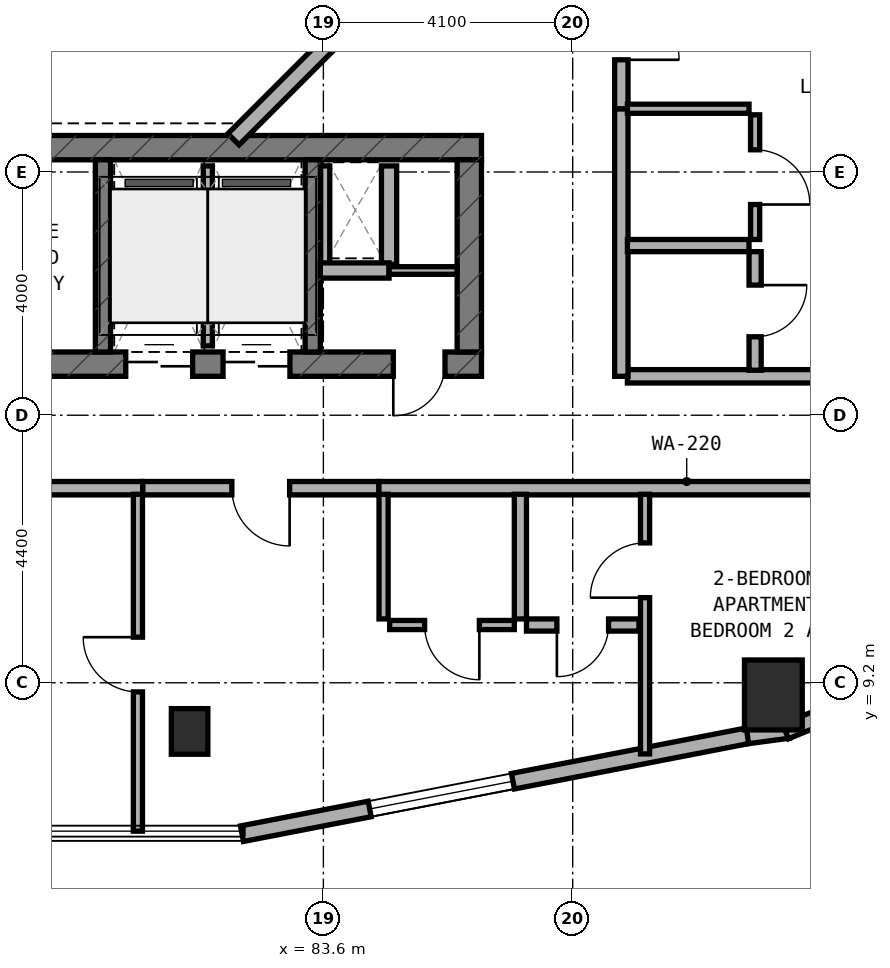
"""IFC4 building model, lengths in metres.
Left out: names, types, materials, properties, quantities, classifications, styles, units other than length and angle.
Written with IfcOpenShell. Run it as: python <this file> out.ifc"""

import sys

from ifc_helpers import new_model, si_unit, direction, frame, frame_2d, origin, origin_2d, place, context, subcontext, project, spatial, rectangle, extrude, element, fill, save


model = new_model("IFC4")
c1 = context("Model", 3, precision=1e-05, world=origin(), true_north=direction((0.0, 1.0)))
c2 = subcontext(c1, "Body", "Model", "MODEL_VIEW")
j1 = project(units=[si_unit("LENGTHUNIT", "METRE"), si_unit("PLANEANGLEUNIT", "RADIAN")], contexts=[c1])
p1 = place(None, origin())
s1 = spatial("IfcSite", under=j1, at=p1, CompositionType="ELEMENT")
p2 = place(p1, origin())
s2 = spatial("IfcBuilding", under=s1, at=p2, CompositionType="ELEMENT")
p3 = place(p2, frame((0.0, 0.0, 98.5)))
s3 = spatial("IfcBuildingStorey", under=s2, at=p3, CompositionType="ELEMENT", Elevation=98.5)
p4 = place(p3, frame((68.0, 14.44, 0.0), z_axis=(0.0, 0.0, 1.0), x_axis=(1.0, 0.0, 0.0)))
e1 = element("IfcWall", 1, at=p4, inside=s3, PredefinedType="SHEAR", context=c2, shape_type="SweptSolid", body=[
    extrude(rectangle(XDim=18.2, YDim=0.4, at=frame_2d((9.1, 0.0))), origin(), (0.0, 0.0, 1.0), 3.5),
])
p5 = place(p4, frame((9.15, 0.0, 0.0)))
e2 = element("IfcOpeningElement", 2, at=p5, cuts=e1, PredefinedType="OPENING", context=c2, shape_type="SweptSolid", body=[
    extrude(rectangle(XDim=1.2, YDim=2.15, at=frame_2d((0.6, 1.075))), frame((0.0, 0.21, 0.0), z_axis=(0.0, -1.0, 0.0), x_axis=(1.0, 0.0, 0.0)), (0.0, 0.0, 1.0), 0.42),
])
p6 = place(p4, frame((16.75, 0.0, 0.0)))
e3 = element("IfcOpeningElement", 3, at=p6, cuts=e1, PredefinedType="OPENING", context=c2, shape_type="SweptSolid", body=[
    extrude(rectangle(XDim=0.85, YDim=2.1, at=frame_2d((0.425, 1.05))), frame((0.0, 0.21, 0.0), z_axis=(0.0, -1.0, 0.0), x_axis=(1.0, 0.0, 0.0)), (0.0, 0.0, 1.0), 0.42),
])
p7 = place(p4, frame((12.35, 0.0, 0.0)))
e4 = element("IfcOpeningElement", 4, at=p7, cuts=e1, PredefinedType="OPENING", context=c2, shape_type="SweptSolid", body=[
    extrude(rectangle(XDim=1.1, YDim=2.15, at=frame_2d((0.55, 1.075))), frame((0.0, 0.21, 0.0), z_axis=(0.0, -1.0, 0.0), x_axis=(1.0, 0.0, 0.0)), (0.0, 0.0, 1.0), 0.42),
])
p8 = place(p4, frame((13.95, 0.0, 0.0)))
e5 = element("IfcOpeningElement", 5, at=p8, cuts=e1, PredefinedType="OPENING", context=c2, shape_type="SweptSolid", body=[
    extrude(rectangle(XDim=1.1, YDim=2.15, at=frame_2d((0.55, 1.075))), frame((0.0, 0.21, 0.0), z_axis=(0.0, -1.0, 0.0), x_axis=(1.0, 0.0, 0.0)), (0.0, 0.0, 1.0), 0.42),
])
p9 = place(p3, frame((68.0, 18.0, 0.0), z_axis=(0.0, 0.0, 1.0), x_axis=(1.0, 0.0, 0.0)))
e6 = element("IfcWall", 6, at=p9, inside=s3, PredefinedType="SHEAR", context=c2, shape_type="SweptSolid", body=[
    extrude(rectangle(XDim=18.2, YDim=0.4, at=frame_2d((9.1, 0.0))), origin(), (0.0, 0.0, 1.0), 3.5),
])
p10 = place(p3, frame((86.0, 14.64, 0.0), z_axis=(0.0, 0.0, 1.0), x_axis=(0.0, 1.0, 0.0)))
e7 = element("IfcWall", 7, at=p10, inside=s3, PredefinedType="SHEAR", context=c2, shape_type="SweptSolid", body=[
    extrude(rectangle(XDim=3.16, YDim=0.4, at=frame_2d((1.58, 0.0))), origin(), (0.0, 0.0, 1.0), 3.5),
])
for number, where, z_axis, x_axis in (
    (8, (79.975, 14.64, 0.0), (0.0, 0.0, 1.0), (0.0, 1.0, 0.0)),
    (9, (83.425, 14.64, 0.0), (0.0, 0.0, 1.0), (0.0, 1.0, 0.0)),
):
    element("IfcWall", number, at=place(p3, frame(where, z_axis=z_axis, x_axis=x_axis)), inside=s3, PredefinedType="STANDARD", context=c2, shape_type="SweptSolid", body=[
        extrude(rectangle(XDim=3.16, YDim=0.25, at=frame_2d((1.58, 0.0))), origin(), (0.0, 0.0, 1.0), 3.25),
    ])
p11 = place(p3, frame((81.4, 8.4, 0.0), z_axis=(0.0, 0.0, 1.0), x_axis=(1.0, 0.0, 0.0)))
e10 = element("IfcColumn", 10, at=p11, inside=s3, PredefinedType="COLUMN", context=c2, shape_type="SweptSolid", body=[
    extrude(rectangle(XDim=0.6, YDim=0.75, at=origin_2d()), origin(), (0.0, 0.0, 1.0), 3.5),
])
p12 = place(p3, frame((91.0, 9.0, 0.0), z_axis=(0.0, 0.0, 1.0), x_axis=(1.0, 0.0, 0.0)))
e11 = element("IfcColumn", 11, at=p12, inside=s3, PredefinedType="COLUMN", context=c2, shape_type="SweptSolid", body=[
    extrude(rectangle(XDim=0.95, YDim=1.15, at=origin_2d()), origin(), (0.0, 0.0, 1.0), 3.5),
])
p13 = place(p3, frame((82.261, 6.718, 0.0), z_axis=(0.0, 0.0, 1.0), x_axis=(0.981750199588, 0.190175039396, 0.0)))
e12 = element("IfcWall", 12, at=p13, inside=s3, PredefinedType="STANDARD", context=c2, shape_type="SweptSolid", body=[
    extrude(rectangle(XDim=8.477, YDim=0.26, at=frame_2d((4.238, 0.0))), origin(), (0.0, 0.0, 1.0), 3.25),
])
p14 = place(p13, frame((2.139, 0.0, 0.8)))
e13 = element("IfcOpeningElement", 13, at=p14, cuts=e12, PredefinedType="OPENING", context=c2, shape_type="SweptSolid", body=[
    extrude(rectangle(XDim=2.4, YDim=1.6, at=frame_2d((1.2, 0.8))), frame((0.0, 0.14, 0.0), z_axis=(0.0, -1.0, 0.0), x_axis=(1.0, 0.0, 0.0)), (0.0, 0.0, 1.0), 0.28),
])
p15 = place(p3, frame((90.575, 8.328, 0.0), z_axis=(0.0, 0.0, 1.0), x_axis=(0.991300187529, 0.13162043232, 0.0)))
e14 = element("IfcWall", 14, at=p15, inside=s3, PredefinedType="STANDARD", context=c2, shape_type="SweptSolid", body=[
    extrude(rectangle(XDim=0.677, YDim=0.26, at=frame_2d((0.338, 0.0))), origin(), (0.0, 0.0, 1.0), 3.25),
])
p16 = place(p3, frame((91.2, 8.399, 0.0), z_axis=(0.0, 0.0, 1.0), x_axis=(0.924093981904, 0.382165294877, 0.0)))
e15 = element("IfcWall", 15, at=p16, inside=s3, PredefinedType="STANDARD", context=c2, shape_type="SweptSolid", body=[
    extrude(rectangle(XDim=0.694, YDim=0.26, at=frame_2d((0.347, 0.0))), origin(), (0.0, 0.0, 1.0), 3.25),
])
p17 = place(p3, frame((82.122, 18.138, 0.0), z_axis=(0.0, 0.0, 1.0), x_axis=(0.707106781187, 0.707106781187, 0.0)))
e16 = element("IfcWall", 16, at=p17, inside=s3, PredefinedType="STANDARD", context=c2, shape_type="SweptSolid", body=[
    extrude(rectangle(XDim=2.311, YDim=0.26, at=frame_2d((1.155, 0.0))), origin(), (0.0, 0.0, 1.0), 3.25),
])
p18 = place(p3, frame((83.63, 16.08, 0.0), z_axis=(0.0, 0.0, 1.0), x_axis=(0.0, 1.0, 0.0)))
e17 = element("IfcWall", 17, at=p18, inside=s3, PredefinedType="PARTITIONING", context=c2, shape_type="SweptSolid", body=[
    extrude(rectangle(XDim=1.62, YDim=0.15, at=frame_2d((0.81, 0.0))), origin(), (0.0, 0.0, 1.0), 2.825),
])
p19 = place(p3, frame((84.68, 16.08, 0.0), z_axis=(0.0, 0.0, 1.0), x_axis=(0.0, 1.0, 0.0)))
e18 = element("IfcWall", 18, at=p19, inside=s3, PredefinedType="SOLIDWALL", context=c2, shape_type="SweptSolid", body=[
    extrude(rectangle(XDim=1.62, YDim=0.25, at=frame_2d((0.81, 0.0))), origin(), (0.0, 0.0, 1.0), 3.22),
])
p20 = place(p3, frame((83.55, 15.98, 0.0), z_axis=(0.0, 0.0, 1.0), x_axis=(1.0, 0.0, 0.0)))
e19 = element("IfcWall", 19, at=p20, inside=s3, PredefinedType="SOLIDWALL", context=c2, shape_type="SweptSolid", body=[
    extrude(rectangle(XDim=1.13, YDim=0.25, at=frame_2d((0.565, 0.0))), origin(), (0.0, 0.0, 1.0), 3.22),
])
p21 = place(p3, frame((84.68, 15.98, 0.0), z_axis=(0.0, 0.0, 1.0), x_axis=(1.0, 0.0, 0.0)))
e20 = element("IfcWall", 20, at=p21, inside=s3, PredefinedType="PARTITIONING", context=c2, shape_type="SweptSolid", body=[
    extrude(rectangle(XDim=1.12, YDim=0.125, at=frame_2d((0.56, 0.0))), origin(), (0.0, 0.0, 1.0), 3.22),
])
p22 = place(p3, frame((81.7, 14.74, 0.0), z_axis=(0.0, 0.0, 1.0), x_axis=(0.0, 1.0, 0.0)))
e21 = element("IfcWall", 21, at=p22, inside=s3, PredefinedType="PARTITIONING", context=c2, shape_type="SweptSolid", body=[
    extrude(rectangle(XDim=2.96, YDim=0.15, at=frame_2d((1.48, 0.0))), origin(), (0.0, 0.0, 1.0), 3.22),
])
p23 = place(p3, frame((74.8, 12.4, 0.0), z_axis=(0.0, 0.0, 1.0), x_axis=(1.0, 0.0, 0.0)))
e22 = element("IfcWall", 22, at=p23, inside=s3, PredefinedType="SOLIDWALL", context=c2, shape_type="SweptSolid", body=[
    extrude(rectangle(XDim=5.83, YDim=0.22, at=frame_2d((2.915, 0.0))), origin(), (0.0, 0.0, 1.0), 3.22),
])
p24 = place(p3, frame((84.51, 12.4, 0.0), z_axis=(0.0, 0.0, 1.0), x_axis=(1.0, 0.0, 0.0)))
e23 = element("IfcWall", 23, at=p24, inside=s3, PredefinedType="SOLIDWALL", context=c2, shape_type="SweptSolid", body=[
    extrude(rectangle(XDim=10.13, YDim=0.22, at=frame_2d((5.065, 0.0))), origin(), (0.0, 0.0, 1.0), 2.945),
])
p25 = place(p3, frame((80.63, 12.4, 0.0), z_axis=(0.0, 0.0, 1.0), x_axis=(1.0, 0.0, 0.0)))
e24 = element("IfcWall", 24, at=p25, inside=s3, PredefinedType="SOLIDWALL", context=c2, shape_type="SweptSolid", body=[
    extrude(rectangle(XDim=3.88, YDim=0.22, at=frame_2d((1.94, 0.0))), origin(), (0.0, 0.0, 1.0), 2.825),
])
p26 = place(p25, frame((1.465, 0.0, 0.0)))
e25 = element("IfcOpeningElement", 25, at=p26, cuts=e24, PredefinedType="OPENING", context=c2, shape_type="SweptSolid", body=[
    extrude(rectangle(XDim=0.95, YDim=2.1, at=frame_2d((0.475, 1.05))), frame((0.0, 0.12, 0.0), z_axis=(0.0, -1.0, 0.0), x_axis=(1.0, 0.0, 0.0)), (0.0, 0.0, 1.0), 0.24),
])
p27 = place(p3, frame((80.55, 6.76, 0.0), z_axis=(0.0, 0.0, 1.0), x_axis=(0.0, 1.0, 0.0)))
e26 = element("IfcWall", 26, at=p27, inside=s3, PredefinedType="PARTITIONING", context=c2, shape_type="SweptSolid", body=[
    extrude(rectangle(XDim=5.54, YDim=0.15, at=frame_2d((2.77, 0.0))), origin(), (0.0, 0.0, 1.0), 2.945),
])
p28 = place(p27, frame((2.29, 0.0, 0.0)))
e27 = element("IfcOpeningElement", 27, at=p28, cuts=e26, PredefinedType="OPENING", context=c2, shape_type="SweptSolid", body=[
    extrude(rectangle(XDim=0.9, YDim=2.1, at=frame_2d((0.45, 1.05))), frame((0.0, 0.085, 0.0), z_axis=(0.0, -1.0, 0.0), x_axis=(1.0, 0.0, 0.0)), (0.0, 0.0, 1.0), 0.17),
])
p29 = place(p3, frame((88.89, 8.03, 0.0), z_axis=(0.0, 0.0, 1.0), x_axis=(0.0, 1.0, 0.0)))
e28 = element("IfcWall", 28, at=p29, inside=s3, PredefinedType="PARTITIONING", context=c2, shape_type="SweptSolid", body=[
    extrude(rectangle(XDim=4.27, YDim=0.15, at=frame_2d((2.135, 0.0))), origin(), (0.0, 0.0, 1.0), 2.945),
])
p30 = place(p29, frame((2.57, 0.0, 0.0)))
e29 = element("IfcOpeningElement", 29, at=p30, cuts=e28, PredefinedType="OPENING", context=c2, shape_type="SweptSolid", body=[
    extrude(rectangle(XDim=0.9, YDim=2.1, at=frame_2d((0.45, 1.05))), frame((0.0, 0.085, 0.0), z_axis=(0.0, -1.0, 0.0), x_axis=(1.0, 0.0, 0.0)), (0.0, 0.0, 1.0), 0.17),
])
p31 = place(p3, frame((86.84, 10.25, 0.0), z_axis=(0.0, 0.0, 1.0), x_axis=(0.0, 1.0, 0.0)))
e30 = element("IfcWall", 30, at=p31, inside=s3, PredefinedType="PLUMBINGWALL", context=c2, shape_type="SweptSolid", body=[
    extrude(rectangle(XDim=2.05, YDim=0.2, at=frame_2d((1.025, 0.0))), origin(), (0.0, 0.0, 1.0), 3.22),
])
p32 = place(p3, frame((84.59, 10.25, 0.0), z_axis=(0.0, 0.0, 1.0), x_axis=(0.0, 1.0, 0.0)))
e31 = element("IfcWall", 31, at=p32, inside=s3, PredefinedType="PARTITIONING", context=c2, shape_type="SweptSolid", body=[
    extrude(rectangle(XDim=2.05, YDim=0.15, at=frame_2d((1.025, 0.0))), origin(), (0.0, 0.0, 1.0), 3.22),
])
p33 = place(p3, frame((86.94, 10.15, 0.0), z_axis=(0.0, 0.0, 1.0), x_axis=(1.0, 0.0, 0.0)))
e32 = element("IfcWall", 32, at=p33, inside=s3, PredefinedType="PLUMBINGWALL", context=c2, shape_type="SweptSolid", body=[
    extrude(rectangle(XDim=1.85, YDim=0.2, at=frame_2d((0.925, 0.0))), origin(), (0.0, 0.0, 1.0), 3.22),
])
p34 = place(p33, frame((0.5, 0.0, 0.0)))
e33 = element("IfcOpeningElement", 33, at=p34, cuts=e32, PredefinedType="OPENING", context=c2, shape_type="SweptSolid", body=[
    extrude(rectangle(XDim=0.85, YDim=2.1, at=frame_2d((0.425, 1.05))), frame((0.0, 0.11, 0.0), z_axis=(0.0, -1.0, 0.0), x_axis=(1.0, 0.0, 0.0)), (0.0, 0.0, 1.0), 0.22),
])
p35 = place(p3, frame((84.69, 10.15, 0.0), z_axis=(0.0, 0.0, 1.0), x_axis=(1.0, 0.0, 0.0)))
e34 = element("IfcWall", 34, at=p35, inside=s3, PredefinedType="PARTITIONING", context=c2, shape_type="SweptSolid", body=[
    extrude(rectangle(XDim=2.05, YDim=0.15, at=frame_2d((1.025, 0.0))), origin(), (0.0, 0.0, 1.0), 3.22),
])
p36 = place(p35, frame((0.575, 0.0, 0.0)))
e35 = element("IfcOpeningElement", 35, at=p36, cuts=e34, PredefinedType="OPENING", context=c2, shape_type="SweptSolid", body=[
    extrude(rectangle(XDim=0.9, YDim=2.1, at=frame_2d((0.45, 1.05))), frame((0.0, 0.085, 0.0), z_axis=(0.0, -1.0, 0.0), x_axis=(1.0, 0.0, 0.0)), (0.0, 0.0, 1.0), 0.17),
])
p37 = place(p3, frame((88.6, 14.24, 0.0), z_axis=(0.0, 0.0, 1.0), x_axis=(1.0, 0.0, 0.0)))
e36 = element("IfcWall", 36, at=p37, inside=s3, PredefinedType="SOLIDWALL", context=c2, shape_type="SweptSolid", body=[
    extrude(rectangle(XDim=5.88, YDim=0.22, at=frame_2d((2.94, 0.0))), origin(), (0.0, 0.0, 1.0), 2.945),
])
p38 = place(p3, frame((88.5, 14.24, 0.0), z_axis=(0.0, 0.0, 1.0), x_axis=(0.0, 1.0, 0.0)))
e37 = element("IfcWall", 37, at=p38, inside=s3, PredefinedType="SOLIDWALL", context=c2, shape_type="SweptSolid", body=[
    extrude(rectangle(XDim=4.4, YDim=0.22, at=frame_2d((2.2, 0.0))), origin(), (0.0, 0.0, 1.0), 3.22),
])
p39 = place(p3, frame((88.5, 18.64, 0.0), z_axis=(0.0, 0.0, 1.0), x_axis=(0.0, 1.0, 0.0)))
e38 = element("IfcWall", 38, at=p39, inside=s3, PredefinedType="SOLIDWALL", context=c2, shape_type="SweptSolid", body=[
    extrude(rectangle(XDim=6.36, YDim=0.22, at=frame_2d((3.18, 0.0))), origin(), (0.0, 0.0, 1.0), 2.825),
])
p40 = place(p39, frame((0.805, 0.0, 0.0)))
e39 = element("IfcOpeningElement", 39, at=p40, cuts=e38, PredefinedType="OPENING", context=c2, shape_type="SweptSolid", body=[
    extrude(rectangle(XDim=0.95, YDim=2.1, at=frame_2d((0.475, 1.05))), frame((0.0, 0.12, 0.0), z_axis=(0.0, -1.0, 0.0), x_axis=(1.0, 0.0, 0.0)), (0.0, 0.0, 1.0), 0.24),
])
p41 = place(p3, frame((88.6, 16.39, 0.0), z_axis=(0.0, 0.0, 1.0), x_axis=(1.0, 0.0, 0.0)))
e40 = element("IfcWall", 40, at=p41, inside=s3, PredefinedType="PLUMBINGWALL", context=c2, shape_type="SweptSolid", body=[
    extrude(rectangle(XDim=2.0, YDim=0.2, at=frame_2d((1.0, 0.0))), origin(), (0.0, 0.0, 1.0), 3.22),
])
p42 = place(p3, frame((88.6, 18.64, 0.0), z_axis=(0.0, 0.0, 1.0), x_axis=(1.0, 0.0, 0.0)))
e41 = element("IfcWall", 41, at=p42, inside=s3, PredefinedType="PARTITIONING", context=c2, shape_type="SweptSolid", body=[
    extrude(rectangle(XDim=2.0, YDim=0.15, at=frame_2d((1.0, 0.0))), origin(), (0.0, 0.0, 1.0), 3.22),
])
p43 = place(p3, frame((90.7, 14.34, 0.0), z_axis=(0.0, 0.0, 1.0), x_axis=(0.0, 1.0, 0.0)))
e42 = element("IfcWall", 42, at=p43, inside=s3, PredefinedType="PLUMBINGWALL", context=c2, shape_type="SweptSolid", body=[
    extrude(rectangle(XDim=1.95, YDim=0.2, at=frame_2d((0.975, 0.0))), origin(), (0.0, 0.0, 1.0), 3.22),
])
p44 = place(p43, frame((0.55, 0.0, 0.0)))
e43 = element("IfcOpeningElement", 43, at=p44, cuts=e42, PredefinedType="OPENING", context=c2, shape_type="SweptSolid", body=[
    extrude(rectangle(XDim=0.85, YDim=2.1, at=frame_2d((0.425, 1.05))), frame((0.0, 0.11, 0.0), z_axis=(0.0, -1.0, 0.0), x_axis=(1.0, 0.0, 0.0)), (0.0, 0.0, 1.0), 0.22),
])
p45 = place(p3, frame((90.7, 16.49, 0.0), z_axis=(0.0, 0.0, 1.0), x_axis=(0.0, 1.0, 0.0)))
e44 = element("IfcWall", 44, at=p45, inside=s3, PredefinedType="PARTITIONING", context=c2, shape_type="SweptSolid", body=[
    extrude(rectangle(XDim=2.05, YDim=0.15, at=frame_2d((1.025, 0.0))), origin(), (0.0, 0.0, 1.0), 3.22),
])
p46 = place(p45, frame((0.575, 0.0, 0.0)))
e45 = element("IfcOpeningElement", 45, at=p46, cuts=e44, PredefinedType="OPENING", context=c2, shape_type="SweptSolid", body=[
    extrude(rectangle(XDim=0.9, YDim=2.1, at=frame_2d((0.45, 1.05))), frame((0.0, 0.085, 0.0), z_axis=(0.0, -1.0, 0.0), x_axis=(1.0, 0.0, 0.0)), (0.0, 0.0, 1.0), 0.17),
])
p47 = place(p14, origin())
e46 = element("IfcWindow", 46, at=p47, inside=s3, PartitioningType="SINGLE_PANEL", PredefinedType="WINDOW", context=c2, shape_type="SweptSolid", body=[
    extrude(rectangle(XDim=2.4, YDim=1.6, at=frame_2d((1.2, 0.8))), frame((0.0, 0.03, 0.0), z_axis=(0.0, -1.0, 0.0), x_axis=(1.0, 0.0, 0.0)), (0.0, 0.0, 1.0), 0.06),
])
fill(e13, e46)
p48 = place(p6, frame((0.85, 0.0, 0.0), z_axis=(0.0, 0.0, 1.0), x_axis=(-1.0, 0.0, 0.0)))
e47 = element("IfcDoor", 47, at=p48, inside=s3, OperationType="SINGLE_SWING_RIGHT", PredefinedType="DOOR", context=c2, shape_type="SweptSolid", body=[
    extrude(rectangle(XDim=0.85, YDim=2.1, at=frame_2d((0.425, 1.05))), frame((0.0, 0.025, 0.0), z_axis=(0.0, -1.0, 0.0), x_axis=(1.0, 0.0, 0.0)), (0.0, 0.0, 1.0), 0.05),
])
fill(e3, e47)
p49 = place(p7, frame((1.1, 0.0, 0.0), z_axis=(0.0, 0.0, 1.0), x_axis=(-1.0, 0.0, 0.0)))
e48 = element("IfcDoor", 48, at=p49, inside=s3, OperationType="DOUBLE_DOOR_SLIDING", PredefinedType="DOOR", context=c2, shape_type="SweptSolid", body=[
    extrude(rectangle(XDim=1.1, YDim=2.15, at=frame_2d((0.55, 1.075))), frame((0.0, 0.025, 0.0), z_axis=(0.0, -1.0, 0.0), x_axis=(1.0, 0.0, 0.0)), (0.0, 0.0, 1.0), 0.05),
])
fill(e4, e48)
p50 = place(p8, frame((1.1, 0.0, 0.0), z_axis=(0.0, 0.0, 1.0), x_axis=(-1.0, 0.0, 0.0)))
e49 = element("IfcDoor", 49, at=p50, inside=s3, OperationType="DOUBLE_DOOR_SLIDING", PredefinedType="DOOR", context=c2, shape_type="SweptSolid", body=[
    extrude(rectangle(XDim=1.1, YDim=2.15, at=frame_2d((0.55, 1.075))), frame((0.0, 0.025, 0.0), z_axis=(0.0, -1.0, 0.0), x_axis=(1.0, 0.0, 0.0)), (0.0, 0.0, 1.0), 0.05),
])
fill(e5, e49)
p51 = place(p26, frame((0.95, 0.0, 0.0), z_axis=(0.0, 0.0, 1.0), x_axis=(-1.0, 0.0, 0.0)))
e50 = element("IfcDoor", 50, at=p51, inside=s3, OperationType="SINGLE_SWING_LEFT", PredefinedType="DOOR", context=c2, shape_type="SweptSolid", body=[
    extrude(rectangle(XDim=0.95, YDim=2.1, at=frame_2d((0.475, 1.05))), frame((0.0, 0.025, 0.0), z_axis=(0.0, -1.0, 0.0), x_axis=(1.0, 0.0, 0.0)), (0.0, 0.0, 1.0), 0.05),
])
fill(e25, e50)
p52 = place(p28, origin())
e51 = element("IfcDoor", 51, at=p52, inside=s3, OperationType="SINGLE_SWING_RIGHT", PredefinedType="DOOR", context=c2, shape_type="SweptSolid", body=[
    extrude(rectangle(XDim=0.9, YDim=2.1, at=frame_2d((0.45, 1.05))), frame((0.0, 0.025, 0.0), z_axis=(0.0, -1.0, 0.0), x_axis=(1.0, 0.0, 0.0)), (0.0, 0.0, 1.0), 0.05),
])
fill(e27, e51)
p53 = place(p30, origin())
e52 = element("IfcDoor", 52, at=p53, inside=s3, OperationType="SINGLE_SWING_LEFT", PredefinedType="DOOR", context=c2, shape_type="SweptSolid", body=[
    extrude(rectangle(XDim=0.9, YDim=2.1, at=frame_2d((0.45, 1.05))), frame((0.0, 0.025, 0.0), z_axis=(0.0, -1.0, 0.0), x_axis=(1.0, 0.0, 0.0)), (0.0, 0.0, 1.0), 0.05),
])
fill(e29, e52)
p54 = place(p34, frame((0.85, 0.0, 0.0), z_axis=(0.0, 0.0, 1.0), x_axis=(-1.0, 0.0, 0.0)))
e53 = element("IfcDoor", 53, at=p54, inside=s3, OperationType="SINGLE_SWING_RIGHT", PredefinedType="DOOR", context=c2, shape_type="SweptSolid", body=[
    extrude(rectangle(XDim=0.85, YDim=2.1, at=frame_2d((0.425, 1.05))), frame((0.0, 0.025, 0.0), z_axis=(0.0, -1.0, 0.0), x_axis=(1.0, 0.0, 0.0)), (0.0, 0.0, 1.0), 0.05),
])
fill(e33, e53)
p55 = place(p36, frame((0.9, 0.0, 0.0), z_axis=(0.0, 0.0, 1.0), x_axis=(-1.0, 0.0, 0.0)))
e54 = element("IfcDoor", 54, at=p55, inside=s3, OperationType="SINGLE_SWING_LEFT", PredefinedType="DOOR", context=c2, shape_type="SweptSolid", body=[
    extrude(rectangle(XDim=0.9, YDim=2.1, at=frame_2d((0.45, 1.05))), frame((0.0, 0.025, 0.0), z_axis=(0.0, -1.0, 0.0), x_axis=(1.0, 0.0, 0.0)), (0.0, 0.0, 1.0), 0.05),
])
fill(e35, e54)
p56 = place(p40, frame((0.95, 0.0, 0.0), z_axis=(0.0, 0.0, 1.0), x_axis=(-1.0, 0.0, 0.0)))
e55 = element("IfcDoor", 55, at=p56, inside=s3, OperationType="SINGLE_SWING_RIGHT", PredefinedType="DOOR", context=c2, shape_type="SweptSolid", body=[
    extrude(rectangle(XDim=0.95, YDim=2.1, at=frame_2d((0.475, 1.05))), frame((0.0, 0.025, 0.0), z_axis=(0.0, -1.0, 0.0), x_axis=(1.0, 0.0, 0.0)), (0.0, 0.0, 1.0), 0.05),
])
fill(e39, e55)
p57 = place(p44, frame((0.85, 0.0, 0.0), z_axis=(0.0, 0.0, 1.0), x_axis=(-1.0, 0.0, 0.0)))
e56 = element("IfcDoor", 56, at=p57, inside=s3, OperationType="SINGLE_SWING_LEFT", PredefinedType="DOOR", context=c2, shape_type="SweptSolid", body=[
    extrude(rectangle(XDim=0.85, YDim=2.1, at=frame_2d((0.425, 1.05))), frame((0.0, 0.025, 0.0), z_axis=(0.0, -1.0, 0.0), x_axis=(1.0, 0.0, 0.0)), (0.0, 0.0, 1.0), 0.05),
])
fill(e43, e56)
p58 = place(p46, frame((0.9, 0.0, 0.0), z_axis=(0.0, 0.0, 1.0), x_axis=(-1.0, 0.0, 0.0)))
e57 = element("IfcDoor", 57, at=p58, inside=s3, OperationType="SINGLE_SWING_RIGHT", PredefinedType="DOOR", context=c2, shape_type="SweptSolid", body=[
    extrude(rectangle(XDim=0.9, YDim=2.1, at=frame_2d((0.45, 1.05))), frame((0.0, 0.025, 0.0), z_axis=(0.0, -1.0, 0.0), x_axis=(1.0, 0.0, 0.0)), (0.0, 0.0, 1.0), 0.05),
])
fill(e45, e57)
save(model, sys.argv[1])
